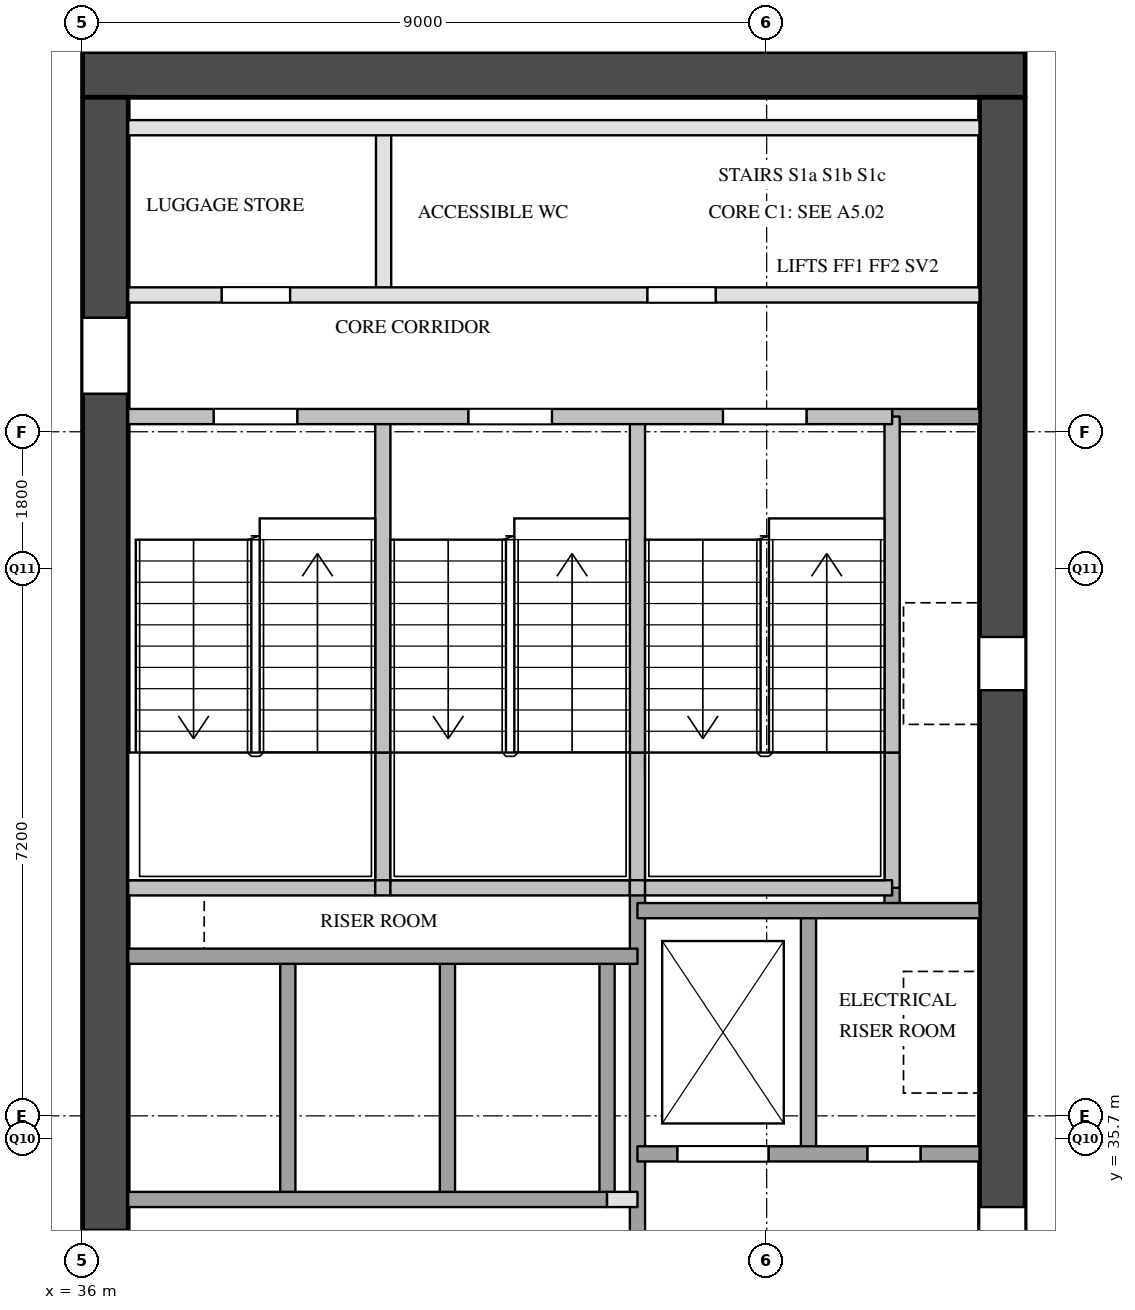
"""IFC4 building model, lengths in metres.
Left out: names, types, materials, properties, quantities, classifications, styles, units other than length and angle.
Written with IfcOpenShell. Run it as: python <this file> out.ifc"""

import sys

from ifc_helpers import new_model, si_unit, direction, frame, frame_2d, origin, place, context, subcontext, project, spatial, rectangle, extrude, element, fill, save


model = new_model("IFC4")
c1 = context("Model", 3, precision=1e-05, world=origin(), true_north=direction((0.0, 1.0)))
c2 = subcontext(c1, "Body", "Model", "MODEL_VIEW")
j1 = project(units=[si_unit("LENGTHUNIT", "METRE"), si_unit("PLANEANGLEUNIT", "RADIAN")], contexts=[c1])
p1 = place(None, origin())
s1 = spatial("IfcSite", under=j1, at=p1, CompositionType="ELEMENT")
p2 = place(p1, origin())
s2 = spatial("IfcBuilding", under=s1, at=p2, CompositionType="ELEMENT")
p3 = place(p2, frame((0.0, 0.0, 104.4)))
s3 = spatial("IfcBuildingStorey", under=s2, at=p3, CompositionType="ELEMENT", Elevation=104.4)
p4 = place(p3, frame((36.0, 49.7, 0.0), z_axis=(0.0, 0.0, 1.0), x_axis=(1.0, 0.0, 0.0)))
e1 = element("IfcWall", 1, at=p4, inside=s3, PredefinedType="SHEAR", context=c2, shape_type="SweptSolid", body=[
    extrude(rectangle(XDim=12.4, YDim=0.6, at=frame_2d((6.2, 0.0))), origin(), (0.0, 0.0, 1.0), 3.5),
])
p5 = place(p3, frame((36.3, 29.1, 0.0), z_axis=(0.0, 0.0, 1.0), x_axis=(0.0, 1.0, 0.0)))
e2 = element("IfcWall", 2, at=p5, inside=s3, PredefinedType="SHEAR", context=c2, shape_type="SweptSolid", body=[
    extrude(rectangle(XDim=20.3, YDim=0.6, at=frame_2d((10.15, 0.0))), origin(), (0.0, 0.0, 1.0), 3.5),
])
p6 = place(p5, frame((3.6, 0.0, 0.0)))
e3 = element("IfcOpeningElement", 3, at=p6, cuts=e2, PredefinedType="OPENING", context=c2, shape_type="SweptSolid", body=[
    extrude(rectangle(XDim=1.8, YDim=2.1, at=frame_2d((0.9, 1.05))), frame((0.0, 0.31, 0.0), z_axis=(0.0, -1.0, 0.0), x_axis=(1.0, 0.0, 0.0)), (0.0, 0.0, 1.0), 0.62),
])
p7 = place(p5, frame((16.4, 0.0, 0.0)))
e4 = element("IfcOpeningElement", 4, at=p7, cuts=e2, PredefinedType="OPENING", context=c2, shape_type="SweptSolid", body=[
    extrude(rectangle(XDim=1.0, YDim=2.1, at=frame_2d((0.5, 1.05))), frame((0.0, 0.31, 0.0), z_axis=(0.0, -1.0, 0.0), x_axis=(1.0, 0.0, 0.0)), (0.0, 0.0, 1.0), 0.62),
])
p8 = place(p3, frame((48.1, 29.1, 0.0), z_axis=(0.0, 0.0, 1.0), x_axis=(0.0, 1.0, 0.0)))
e5 = element("IfcWall", 5, at=p8, inside=s3, PredefinedType="SHEAR", context=c2, shape_type="SweptSolid", body=[
    extrude(rectangle(XDim=20.3, YDim=0.6, at=frame_2d((10.15, 0.0))), origin(), (0.0, 0.0, 1.0), 3.5),
])
p9 = place(p8, frame((12.5, 0.0, 0.0)))
e6 = element("IfcOpeningElement", 6, at=p9, cuts=e5, PredefinedType="OPENING", context=c2, shape_type="SweptSolid", body=[
    extrude(rectangle(XDim=0.7, YDim=2.1, at=frame_2d((0.35, 1.05))), frame((0.0, 0.31, 0.0), z_axis=(0.0, -1.0, 0.0), x_axis=(1.0, 0.0, 0.0)), (0.0, 0.0, 1.0), 0.62),
])
p10 = place(p8, frame((3.9, 0.0, 0.0)))
e7 = element("IfcOpeningElement", 7, at=p10, cuts=e5, PredefinedType="OPENING", context=c2, shape_type="SweptSolid", body=[
    extrude(rectangle(XDim=1.8, YDim=2.1, at=frame_2d((0.9, 1.05))), frame((0.0, 0.31, 0.0), z_axis=(0.0, -1.0, 0.0), x_axis=(1.0, 0.0, 0.0)), (0.0, 0.0, 1.0), 0.62),
])
p11 = place(p3, frame((38.7, 34.9, 0.0), z_axis=(0.0, 0.0, 1.0), x_axis=(0.0, 1.0, 0.0)))
e8 = element("IfcWall", 8, at=p11, inside=s3, PredefinedType="SOLIDWALL", context=c2, shape_type="SweptSolid", body=[
    extrude(rectangle(XDim=3.2, YDim=0.2, at=frame_2d((1.6, 0.0))), origin(), (0.0, 0.0, 1.0), 3.5),
])
p12 = place(p3, frame((39.95, 39.0, 0.0), z_axis=(0.0, 0.0, 1.0), x_axis=(0.0, 1.0, 0.0)))
e9 = element("IfcWall", 9, at=p12, inside=s3, PredefinedType="SOLIDWALL", context=c2, shape_type="SweptSolid", body=[
    extrude(rectangle(XDim=1.78, YDim=0.2, at=frame_2d((0.89, 0.0))), origin(), (0.0, 0.0, 1.0), 3.5),
])
p13 = place(p3, frame((39.95, 40.78, 0.0), z_axis=(0.0, 0.0, 1.0), x_axis=(0.0, 1.0, 0.0)))
e10 = element("IfcWall", 10, at=p13, inside=s3, PredefinedType="SOLIDWALL", context=c2, shape_type="SweptSolid", body=[
    extrude(rectangle(XDim=4.42, YDim=0.2, at=frame_2d((2.21, 0.0))), origin(), (0.0, 0.0, 1.0), 3.5),
])
p14 = place(p3, frame((39.96, 46.8, 0.0), z_axis=(0.0, 0.0, 1.0), x_axis=(0.0, 1.0, 0.0)))
e11 = element("IfcWall", 11, at=p14, inside=s3, PredefinedType="PARTITIONING", context=c2, shape_type="SweptSolid", body=[
    extrude(rectangle(XDim=2.2, YDim=0.2, at=frame_2d((1.1, 0.0))), origin(), (0.0, 0.0, 1.0), 3.5),
])
for number, where, z_axis, x_axis in (
    (12, (40.8, 34.9, 0.0), (0.0, 0.0, 1.0), (0.0, 1.0, 0.0)),
    (13, (42.9, 34.9, 0.0), (0.0, 0.0, 1.0), (0.0, 1.0, 0.0)),
):
    element("IfcWall", number, at=place(p3, frame(where, z_axis=z_axis, x_axis=x_axis)), inside=s3, PredefinedType="SOLIDWALL", context=c2, shape_type="SweptSolid", body=[
        extrude(rectangle(XDim=3.2, YDim=0.2, at=frame_2d((1.6, 0.0))), origin(), (0.0, 0.0, 1.0), 3.5),
    ])
p15 = place(p3, frame((43.3, 29.1, 0.0), z_axis=(0.0, 0.0, 1.0), x_axis=(0.0, 1.0, 0.0)))
e14 = element("IfcWall", 14, at=p15, inside=s3, PredefinedType="SOLIDWALL", context=c2, shape_type="SweptSolid", body=[
    extrude(rectangle(XDim=9.9, YDim=0.2, at=frame_2d((4.95, 0.0))), origin(), (0.0, 0.0, 1.0), 3.5),
])
p16 = place(p3, frame((43.3, 39.0, 0.0), z_axis=(0.0, 0.0, 1.0), x_axis=(0.0, 1.0, 0.0)))
e15 = element("IfcWall", 15, at=p16, inside=s3, PredefinedType="SOLIDWALL", context=c2, shape_type="SweptSolid", body=[
    extrude(rectangle(XDim=1.78, YDim=0.2, at=frame_2d((0.89, 0.0))), origin(), (0.0, 0.0, 1.0), 3.5),
])
p17 = place(p3, frame((43.3, 40.78, 0.0), z_axis=(0.0, 0.0, 1.0), x_axis=(0.0, 1.0, 0.0)))
e16 = element("IfcWall", 16, at=p17, inside=s3, PredefinedType="SOLIDWALL", context=c2, shape_type="SweptSolid", body=[
    extrude(rectangle(XDim=4.42, YDim=0.2, at=frame_2d((2.21, 0.0))), origin(), (0.0, 0.0, 1.0), 3.5),
])
p18 = place(p3, frame((45.55, 35.5, 0.0), z_axis=(0.0, 0.0, 1.0), x_axis=(0.0, 1.0, 0.0)))
e17 = element("IfcWall", 17, at=p18, inside=s3, PredefinedType="SOLIDWALL", context=c2, shape_type="SweptSolid", body=[
    extrude(rectangle(XDim=3.2, YDim=0.2, at=frame_2d((1.6, 0.0))), origin(), (0.0, 0.0, 1.0), 3.5),
])
p19 = place(p3, frame((46.65, 38.7, 0.0), z_axis=(0.0, 0.0, 1.0), x_axis=(0.0, 1.0, 0.0)))
e18 = element("IfcWall", 18, at=p19, inside=s3, PredefinedType="SOLIDWALL", context=c2, shape_type="SweptSolid", body=[
    extrude(rectangle(XDim=0.3, YDim=0.2, at=frame_2d((0.15, 0.0))), origin(), (0.0, 0.0, 1.0), 3.5),
])
p20 = place(p3, frame((46.65, 39.0, 0.0), z_axis=(0.0, 0.0, 1.0), x_axis=(0.0, 1.0, 0.0)))
e19 = element("IfcWall", 19, at=p20, inside=s3, PredefinedType="SOLIDWALL", context=c2, shape_type="SweptSolid", body=[
    extrude(rectangle(XDim=1.78, YDim=0.2, at=frame_2d((0.89, 0.0))), origin(), (0.0, 0.0, 1.0), 3.5),
])
p21 = place(p3, frame((46.65, 40.78, 0.0), z_axis=(0.0, 0.0, 1.0), x_axis=(0.0, 1.0, 0.0)))
e20 = element("IfcWall", 20, at=p21, inside=s3, PredefinedType="SOLIDWALL", context=c2, shape_type="SweptSolid", body=[
    extrude(rectangle(XDim=4.42, YDim=0.2, at=frame_2d((2.21, 0.0))), origin(), (0.0, 0.0, 1.0), 3.5),
])
p22 = place(p3, frame((42.9, 34.9, 0.0), z_axis=(0.0, 0.0, 1.0), x_axis=(1.0, 0.0, 0.0)))
e21 = element("IfcWall", 21, at=p22, inside=s3, PredefinedType="PARTITIONING", context=c2, shape_type="SweptSolid", body=[
    extrude(rectangle(XDim=0.4, YDim=0.2, at=frame_2d((0.2, 0.0))), origin(), (0.0, 0.0, 1.0), 3.5),
])
p23 = place(p3, frame((36.6, 34.9, 0.0), z_axis=(0.0, 0.0, 1.0), x_axis=(1.0, 0.0, 0.0)))
e22 = element("IfcWall", 22, at=p23, inside=s3, PredefinedType="SOLIDWALL", context=c2, shape_type="SweptSolid", body=[
    extrude(rectangle(XDim=6.3, YDim=0.2, at=frame_2d((3.15, 0.0))), origin(), (0.0, 0.0, 1.0), 3.5),
])
p24 = place(p3, frame((43.3, 35.5, 0.0), z_axis=(0.0, 0.0, 1.0), x_axis=(1.0, 0.0, 0.0)))
e23 = element("IfcWall", 23, at=p24, inside=s3, PredefinedType="SOLIDWALL", context=c2, shape_type="SweptSolid", body=[
    extrude(rectangle(XDim=4.5, YDim=0.2, at=frame_2d((2.25, 0.0))), origin(), (0.0, 0.0, 1.0), 3.5),
])
p25 = place(p24, frame((0.525, 0.0, 0.0)))
e24 = element("IfcOpeningElement", 24, at=p25, cuts=e23, PredefinedType="OPENING", context=c2, shape_type="SweptSolid", body=[
    extrude(rectangle(XDim=1.2, YDim=2.1, at=frame_2d((0.6, 1.05))), frame((0.0, 0.11, 0.0), z_axis=(0.0, -1.0, 0.0), x_axis=(1.0, 0.0, 0.0)), (0.0, 0.0, 1.0), 0.22),
])
p26 = place(p24, frame((3.025, 0.0, 0.0)))
e25 = element("IfcOpeningElement", 25, at=p26, cuts=e23, PredefinedType="OPENING", context=c2, shape_type="SweptSolid", body=[
    extrude(rectangle(XDim=0.7, YDim=2.1, at=frame_2d((0.35, 1.05))), frame((0.0, 0.11, 0.0), z_axis=(0.0, -1.0, 0.0), x_axis=(1.0, 0.0, 0.0)), (0.0, 0.0, 1.0), 0.22),
])
p27 = place(p3, frame((36.6, 38.1, 0.0), z_axis=(0.0, 0.0, 1.0), x_axis=(1.0, 0.0, 0.0)))
e26 = element("IfcWall", 26, at=p27, inside=s3, PredefinedType="SOLIDWALL", context=c2, shape_type="SweptSolid", body=[
    extrude(rectangle(XDim=6.7, YDim=0.2, at=frame_2d((3.35, 0.0))), origin(), (0.0, 0.0, 1.0), 3.5),
])
p28 = place(p3, frame((43.3, 38.7, 0.0), z_axis=(0.0, 0.0, 1.0), x_axis=(1.0, 0.0, 0.0)))
e27 = element("IfcWall", 27, at=p28, inside=s3, PredefinedType="SOLIDWALL", context=c2, shape_type="SweptSolid", body=[
    extrude(rectangle(XDim=4.5, YDim=0.2, at=frame_2d((2.25, 0.0))), origin(), (0.0, 0.0, 1.0), 3.5),
])
p29 = place(p3, frame((36.6, 39.0, 0.0), z_axis=(0.0, 0.0, 1.0), x_axis=(1.0, 0.0, 0.0)))
e28 = element("IfcWall", 28, at=p29, inside=s3, PredefinedType="SOLIDWALL", context=c2, shape_type="SweptSolid", body=[
    extrude(rectangle(XDim=3.25, YDim=0.2, at=frame_2d((1.625, 0.0))), origin(), (0.0, 0.0, 1.0), 3.5),
])
p30 = place(p3, frame((39.85, 39.0, 0.0), z_axis=(0.0, 0.0, 1.0), x_axis=(1.0, 0.0, 0.0)))
e29 = element("IfcWall", 29, at=p30, inside=s3, PredefinedType="SOLIDWALL", context=c2, shape_type="SweptSolid", body=[
    extrude(rectangle(XDim=0.2, YDim=0.2, at=frame_2d((0.1, 0.0))), origin(), (0.0, 0.0, 1.0), 3.5),
])
p31 = place(p3, frame((40.05, 39.0, 0.0), z_axis=(0.0, 0.0, 1.0), x_axis=(1.0, 0.0, 0.0)))
e30 = element("IfcWall", 30, at=p31, inside=s3, PredefinedType="SOLIDWALL", context=c2, shape_type="SweptSolid", body=[
    extrude(rectangle(XDim=3.15, YDim=0.2, at=frame_2d((1.575, 0.0))), origin(), (0.0, 0.0, 1.0), 3.5),
])
p32 = place(p3, frame((43.2, 39.0, 0.0), z_axis=(0.0, 0.0, 1.0), x_axis=(1.0, 0.0, 0.0)))
e31 = element("IfcWall", 31, at=p32, inside=s3, PredefinedType="SOLIDWALL", context=c2, shape_type="SweptSolid", body=[
    extrude(rectangle(XDim=0.2, YDim=0.2, at=frame_2d((0.1, 0.0))), origin(), (0.0, 0.0, 1.0), 3.5),
])
p33 = place(p3, frame((43.4, 39.0, 0.0), z_axis=(0.0, 0.0, 1.0), x_axis=(1.0, 0.0, 0.0)))
e32 = element("IfcWall", 32, at=p33, inside=s3, PredefinedType="SOLIDWALL", context=c2, shape_type="SweptSolid", body=[
    extrude(rectangle(XDim=3.25, YDim=0.2, at=frame_2d((1.625, 0.0))), origin(), (0.0, 0.0, 1.0), 3.5),
])
p34 = place(p3, frame((46.65, 45.2, 0.0), z_axis=(0.0, 0.0, 1.0), x_axis=(1.0, 0.0, 0.0)))
e33 = element("IfcWall", 33, at=p34, inside=s3, PredefinedType="SOLIDWALL", context=c2, shape_type="SweptSolid", body=[
    extrude(rectangle(XDim=1.15, YDim=0.2, at=frame_2d((0.575, 0.0))), origin(), (0.0, 0.0, 1.0), 3.5),
])
p35 = place(p3, frame((36.6, 45.2, 0.0), z_axis=(0.0, 0.0, 1.0), x_axis=(1.0, 0.0, 0.0)))
e34 = element("IfcWall", 34, at=p35, inside=s3, PredefinedType="SOLIDWALL", context=c2, shape_type="SweptSolid", body=[
    extrude(rectangle(XDim=10.05, YDim=0.2, at=frame_2d((5.025, 0.0))), origin(), (0.0, 0.0, 1.0), 3.5),
])
p36 = place(p35, frame((1.125, 0.0, 0.0)))
e35 = element("IfcOpeningElement", 35, at=p36, cuts=e34, PredefinedType="OPENING", context=c2, shape_type="SweptSolid", body=[
    extrude(rectangle(XDim=1.1, YDim=2.1, at=frame_2d((0.55, 1.05))), frame((0.0, 0.11, 0.0), z_axis=(0.0, -1.0, 0.0), x_axis=(1.0, 0.0, 0.0)), (0.0, 0.0, 1.0), 0.22),
])
p37 = place(p35, frame((4.475, 0.0, 0.0)))
e36 = element("IfcOpeningElement", 36, at=p37, cuts=e34, PredefinedType="OPENING", context=c2, shape_type="SweptSolid", body=[
    extrude(rectangle(XDim=1.1, YDim=2.1, at=frame_2d((0.55, 1.05))), frame((0.0, 0.11, 0.0), z_axis=(0.0, -1.0, 0.0), x_axis=(1.0, 0.0, 0.0)), (0.0, 0.0, 1.0), 0.22),
])
p38 = place(p35, frame((7.825, 0.0, 0.0)))
e37 = element("IfcOpeningElement", 37, at=p38, cuts=e34, PredefinedType="OPENING", context=c2, shape_type="SweptSolid", body=[
    extrude(rectangle(XDim=1.1, YDim=2.1, at=frame_2d((0.55, 1.05))), frame((0.0, 0.11, 0.0), z_axis=(0.0, -1.0, 0.0), x_axis=(1.0, 0.0, 0.0)), (0.0, 0.0, 1.0), 0.22),
])
p39 = place(p3, frame((36.6, 46.8, 0.0), z_axis=(0.0, 0.0, 1.0), x_axis=(1.0, 0.0, 0.0)))
e38 = element("IfcWall", 38, at=p39, inside=s3, PredefinedType="PARTITIONING", context=c2, shape_type="SweptSolid", body=[
    extrude(rectangle(XDim=11.2, YDim=0.2, at=frame_2d((5.6, 0.0))), origin(), (0.0, 0.0, 1.0), 3.5),
])
p40 = place(p39, frame((1.23, 0.0, 0.0)))
e39 = element("IfcOpeningElement", 39, at=p40, cuts=e38, PredefinedType="OPENING", context=c2, shape_type="SweptSolid", body=[
    extrude(rectangle(XDim=0.9, YDim=2.1, at=frame_2d((0.45, 1.05))), frame((0.0, 0.11, 0.0), z_axis=(0.0, -1.0, 0.0), x_axis=(1.0, 0.0, 0.0)), (0.0, 0.0, 1.0), 0.22),
])
p41 = place(p39, frame((6.83, 0.0, 0.0)))
e40 = element("IfcOpeningElement", 40, at=p41, cuts=e38, PredefinedType="OPENING", context=c2, shape_type="SweptSolid", body=[
    extrude(rectangle(XDim=0.9, YDim=2.1, at=frame_2d((0.45, 1.05))), frame((0.0, 0.11, 0.0), z_axis=(0.0, -1.0, 0.0), x_axis=(1.0, 0.0, 0.0)), (0.0, 0.0, 1.0), 0.22),
])
p42 = place(p3, frame((36.6, 49.0, 0.0), z_axis=(0.0, 0.0, 1.0), x_axis=(1.0, 0.0, 0.0)))
e41 = element("IfcWall", 41, at=p42, inside=s3, PredefinedType="PARTITIONING", context=c2, shape_type="SweptSolid", body=[
    extrude(rectangle(XDim=11.2, YDim=0.2, at=frame_2d((5.6, 0.0))), origin(), (0.0, 0.0, 1.0), 3.5),
])
p43 = place(p25, origin())
e42 = element("IfcDoor", 42, at=p43, inside=s3, OperationType="SLIDING_TO_LEFT", PredefinedType="DOOR", context=c2, shape_type="SweptSolid", body=[
    extrude(rectangle(XDim=1.2, YDim=2.1, at=frame_2d((0.6, 1.05))), frame((0.0, 0.025, 0.0), z_axis=(0.0, -1.0, 0.0), x_axis=(1.0, 0.0, 0.0)), (0.0, 0.0, 1.0), 0.05),
])
fill(e24, e42)
p44 = place(p6, origin())
e43 = element("IfcDoor", 43, at=p44, inside=s3, OperationType="DOUBLE_DOOR_SINGLE_SWING", PredefinedType="DOOR", context=c2, shape_type="SweptSolid", body=[
    extrude(rectangle(XDim=1.8, YDim=2.1, at=frame_2d((0.9, 1.05))), frame((0.0, 0.025, 0.0), z_axis=(0.0, -1.0, 0.0), x_axis=(1.0, 0.0, 0.0)), (0.0, 0.0, 1.0), 0.05),
])
fill(e3, e43)
p45 = place(p36, origin())
e44 = element("IfcDoor", 44, at=p45, inside=s3, OperationType="SINGLE_SWING_LEFT", PredefinedType="DOOR", context=c2, shape_type="SweptSolid", body=[
    extrude(rectangle(XDim=1.1, YDim=2.1, at=frame_2d((0.55, 1.05))), frame((0.0, 0.025, 0.0), z_axis=(0.0, -1.0, 0.0), x_axis=(1.0, 0.0, 0.0)), (0.0, 0.0, 1.0), 0.05),
])
fill(e35, e44)
p46 = place(p37, origin())
e45 = element("IfcDoor", 45, at=p46, inside=s3, OperationType="SINGLE_SWING_RIGHT", PredefinedType="DOOR", context=c2, shape_type="SweptSolid", body=[
    extrude(rectangle(XDim=1.1, YDim=2.1, at=frame_2d((0.55, 1.05))), frame((0.0, 0.025, 0.0), z_axis=(0.0, -1.0, 0.0), x_axis=(1.0, 0.0, 0.0)), (0.0, 0.0, 1.0), 0.05),
])
fill(e36, e45)
p47 = place(p38, origin())
e46 = element("IfcDoor", 46, at=p47, inside=s3, OperationType="SINGLE_SWING_RIGHT", PredefinedType="DOOR", context=c2, shape_type="SweptSolid", body=[
    extrude(rectangle(XDim=1.1, YDim=2.1, at=frame_2d((0.55, 1.05))), frame((0.0, 0.025, 0.0), z_axis=(0.0, -1.0, 0.0), x_axis=(1.0, 0.0, 0.0)), (0.0, 0.0, 1.0), 0.05),
])
fill(e37, e46)
p48 = place(p9, origin())
e47 = element("IfcDoor", 47, at=p48, inside=s3, OperationType="SINGLE_SWING_RIGHT", PredefinedType="DOOR", context=c2, shape_type="SweptSolid", body=[
    extrude(rectangle(XDim=0.7, YDim=2.1, at=frame_2d((0.35, 1.05))), frame((0.0, 0.025, 0.0), z_axis=(0.0, -1.0, 0.0), x_axis=(1.0, 0.0, 0.0)), (0.0, 0.0, 1.0), 0.05),
])
fill(e6, e47)
p49 = place(p10, origin())
e48 = element("IfcDoor", 48, at=p49, inside=s3, OperationType="DOUBLE_DOOR_SINGLE_SWING", PredefinedType="DOOR", context=c2, shape_type="SweptSolid", body=[
    extrude(rectangle(XDim=1.8, YDim=2.1, at=frame_2d((0.9, 1.05))), frame((0.0, 0.025, 0.0), z_axis=(0.0, -1.0, 0.0), x_axis=(1.0, 0.0, 0.0)), (0.0, 0.0, 1.0), 0.05),
])
fill(e7, e48)
p50 = place(p26, origin())
e49 = element("IfcDoor", 49, at=p50, inside=s3, OperationType="SINGLE_SWING_RIGHT", PredefinedType="DOOR", context=c2, shape_type="SweptSolid", body=[
    extrude(rectangle(XDim=0.7, YDim=2.1, at=frame_2d((0.35, 1.05))), frame((0.0, 0.025, 0.0), z_axis=(0.0, -1.0, 0.0), x_axis=(1.0, 0.0, 0.0)), (0.0, 0.0, 1.0), 0.05),
])
fill(e25, e49)
p51 = place(p7, origin())
e50 = element("IfcDoor", 50, at=p51, inside=s3, OperationType="SINGLE_SWING_RIGHT", PredefinedType="DOOR", context=c2, shape_type="SweptSolid", body=[
    extrude(rectangle(XDim=1.0, YDim=2.1, at=frame_2d((0.5, 1.05))), frame((0.0, 0.025, 0.0), z_axis=(0.0, -1.0, 0.0), x_axis=(1.0, 0.0, 0.0)), (0.0, 0.0, 1.0), 0.05),
])
fill(e4, e50)
p52 = place(p40, origin())
e51 = element("IfcDoor", 51, at=p52, inside=s3, OperationType="SINGLE_SWING_LEFT", PredefinedType="DOOR", context=c2, shape_type="SweptSolid", body=[
    extrude(rectangle(XDim=0.9, YDim=2.1, at=frame_2d((0.45, 1.05))), frame((0.0, 0.025, 0.0), z_axis=(0.0, -1.0, 0.0), x_axis=(1.0, 0.0, 0.0)), (0.0, 0.0, 1.0), 0.05),
])
fill(e39, e51)
p53 = place(p41, origin())
e52 = element("IfcDoor", 52, at=p53, inside=s3, OperationType="SINGLE_SWING_RIGHT", PredefinedType="DOOR", context=c2, shape_type="SweptSolid", body=[
    extrude(rectangle(XDim=0.9, YDim=2.1, at=frame_2d((0.45, 1.05))), frame((0.0, 0.025, 0.0), z_axis=(0.0, -1.0, 0.0), x_axis=(1.0, 0.0, 0.0)), (0.0, 0.0, 1.0), 0.05),
])
fill(e40, e52)
save(model, sys.argv[1])
